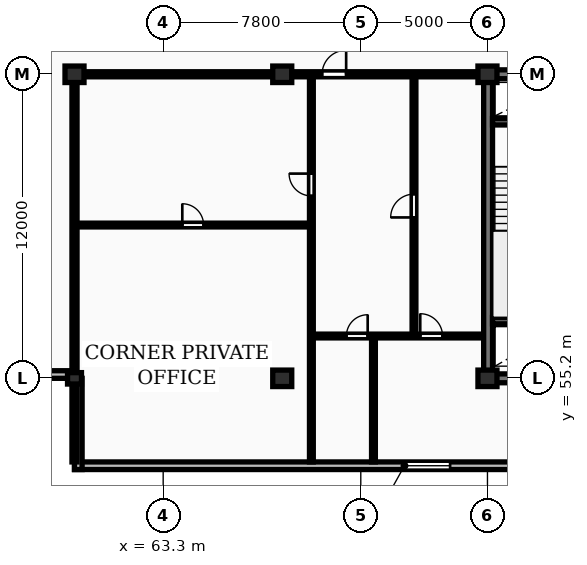
"""IFC4 building model, lengths in metres.
Left out: names, types, materials, properties, quantities, classifications, styles, units other than length and angle.
Written with IfcOpenShell. Run it as: python <this file> out.ifc"""

import sys

from ifc_helpers import new_model, si_unit, direction, frame, frame_2d, origin, origin_2d, place, context, subcontext, project, spatial, rectangle, extrude, element, fill, save


model = new_model("IFC4")
c1 = context("Model", 3, precision=1e-05, world=origin(), true_north=direction((0.0, 1.0)))
c2 = subcontext(c1, "Body", "Model", "MODEL_VIEW")
j1 = project(units=[si_unit("LENGTHUNIT", "METRE"), si_unit("PLANEANGLEUNIT", "RADIAN")], contexts=[c1])
p1 = place(None, origin())
s1 = spatial("IfcSite", under=j1, at=p1, CompositionType="ELEMENT")
p2 = place(p1, origin())
s2 = spatial("IfcBuilding", under=s1, at=p2, CompositionType="ELEMENT")
p3 = place(p2, frame((0.0, 0.0, 228.65)))
s3 = spatial("IfcBuildingStorey", under=s2, at=p3, CompositionType="ELEMENT", Elevation=228.65)
p4 = place(p3, frame((59.8, 55.2, 0.0), z_axis=(0.0, 0.0, 1.0), x_axis=(1.0, 0.0, 0.0)))
e1 = element("IfcColumn", 1, at=p4, inside=s3, PredefinedType="PILASTER", context=c2, shape_type="SweptSolid", body=[
    extrude(rectangle(XDim=0.55, YDim=0.45, at=origin_2d()), origin(), (0.0, 0.0, 1.0), 3.45),
])
for number, where, z_axis, x_axis in (
    (2, (59.8, 67.2, 0.0), (0.0, 0.0, 1.0), (1.0, 0.0, 0.0)),
    (3, (68.0, 55.2, 0.0), (0.0, 0.0, 1.0), (1.0, 0.0, 0.0)),
    (4, (68.0, 67.2, 0.0), (0.0, 0.0, 1.0), (1.0, 0.0, 0.0)),
    (5, (76.1, 55.2, 0.0), (0.0, 0.0, 1.0), (1.0, 0.0, 0.0)),
    (6, (76.1, 67.2, 0.0), (0.0, 0.0, 1.0), (1.0, 0.0, 0.0)),
):
    element("IfcColumn", number, at=place(p3, frame(where, z_axis=z_axis, x_axis=x_axis)), inside=s3, PredefinedType="COLUMN", context=c2, shape_type="SweptSolid", body=[
        extrude(rectangle(XDim=0.75, YDim=0.65, at=origin_2d()), origin(), (0.0, 0.0, 1.0), 3.45),
    ])
p5 = place(p3, frame((59.8, 51.75, 0.0), z_axis=(0.0, 0.0, 1.0), x_axis=(1.0, 0.0, 0.0)))
e7 = element("IfcWall", 7, at=p5, inside=s3, PredefinedType="STANDARD", context=c2, shape_type="SweptSolid", body=[
    extrude(rectangle(XDim=68.6, YDim=0.3, at=frame_2d((34.3, 0.0))), origin(), (0.0, 0.0, 1.0), 3.17),
])
p6 = place(p5, frame((13.025, 0.0, 0.85)))
e8 = element("IfcOpeningElement", 8, at=p6, cuts=e7, PredefinedType="OPENING", context=c2, shape_type="SweptSolid", body=[
    extrude(rectangle(XDim=1.8, YDim=1.8, at=frame_2d((0.9, 0.9))), frame((0.0, 0.16, 0.0), z_axis=(0.0, -1.0, 0.0), x_axis=(1.0, 0.0, 0.0)), (0.0, 0.0, 1.0), 0.32),
])
p7 = place(p5, frame((56.375, 0.0, 0.85)))
e9 = element("IfcOpeningElement", 9, at=p7, cuts=e7, PredefinedType="OPENING", context=c2, shape_type="SweptSolid", body=[
    extrude(rectangle(XDim=1.8, YDim=1.8, at=frame_2d((0.9, 0.9))), frame((0.0, 0.16, 0.0), z_axis=(0.0, -1.0, 0.0), x_axis=(1.0, 0.0, 0.0)), (0.0, 0.0, 1.0), 0.32),
])
p8 = place(p3, frame((56.2, 55.35, 0.0), z_axis=(0.0, 0.0, 1.0), x_axis=(1.0, 0.0, 0.0)))
e10 = element("IfcWall", 10, at=p8, inside=s3, PredefinedType="STANDARD", context=c2, shape_type="SweptSolid", body=[
    extrude(rectangle(XDim=3.6, YDim=0.3, at=frame_2d((1.8, 0.0))), origin(), (0.0, 0.0, 1.0), 3.17),
])
p9 = place(p3, frame((59.95, 55.2, 0.0), z_axis=(0.0, 0.0, 1.0), x_axis=(0.0, -1.0, 0.0)))
e11 = element("IfcWall", 11, at=p9, inside=s3, PredefinedType="STANDARD", context=c2, shape_type="SweptSolid", body=[
    extrude(rectangle(XDim=3.6, YDim=0.3, at=frame_2d((1.8, 0.0))), origin(), (0.0, 0.0, 1.0), 3.17),
])
p10 = place(p3, frame((75.95, 55.2, 0.0), z_axis=(0.0, 0.0, 1.0), x_axis=(1.0, 0.0, 0.0)))
e12 = element("IfcWall", 12, at=p10, inside=s3, PredefinedType="SHEAR", context=c2, shape_type="SweptSolid", body=[
    extrude(rectangle(XDim=36.3, YDim=0.35, at=frame_2d((18.15, 0.0))), origin(), (0.0, 0.0, 1.0), 3.45),
])
p11 = place(p3, frame((76.125, 55.375, 0.0), z_axis=(0.0, 0.0, 1.0), x_axis=(0.0, 1.0, 0.0)))
e13 = element("IfcWall", 13, at=p11, inside=s3, PredefinedType="SHEAR", context=c2, shape_type="SweptSolid", body=[
    extrude(rectangle(XDim=11.65, YDim=0.35, at=frame_2d((5.825, 0.0))), origin(), (0.0, 0.0, 1.0), 3.45),
])
p12 = place(p3, frame((75.95, 67.2, 0.0), z_axis=(0.0, 0.0, 1.0), x_axis=(1.0, 0.0, 0.0)))
e14 = element("IfcWall", 14, at=p12, inside=s3, PredefinedType="SHEAR", context=c2, shape_type="SweptSolid", body=[
    extrude(rectangle(XDim=36.3, YDim=0.35, at=frame_2d((18.15, 0.0))), origin(), (0.0, 0.0, 1.0), 3.45),
])
p13 = place(p12, frame((5.25, 0.0, 0.0)))
e15 = element("IfcOpeningElement", 15, at=p13, cuts=e14, PredefinedType="OPENING", context=c2, shape_type="SweptSolid", body=[
    extrude(rectangle(XDim=1.0, YDim=2.15, at=frame_2d((0.5, 1.075))), frame((0.0, 0.185, 0.0), z_axis=(0.0, -1.0, 0.0), x_axis=(1.0, 0.0, 0.0)), (0.0, 0.0, 1.0), 0.37),
])
p14 = place(p12, frame((21.6, 0.0, 0.0)))
e16 = element("IfcOpeningElement", 16, at=p14, cuts=e14, PredefinedType="OPENING", context=c2, shape_type="SweptSolid", body=[
    extrude(rectangle(XDim=1.5, YDim=2.2, at=frame_2d((0.75, 1.1))), frame((0.0, 0.185, 0.0), z_axis=(0.0, -1.0, 0.0), x_axis=(1.0, 0.0, 0.0)), (0.0, 0.0, 1.0), 0.37),
])
p15 = place(p12, frame((30.45, 0.0, 0.0)))
e17 = element("IfcOpeningElement", 17, at=p15, cuts=e14, PredefinedType="OPENING", context=c2, shape_type="SweptSolid", body=[
    extrude(rectangle(XDim=1.0, YDim=2.15, at=frame_2d((0.5, 1.075))), frame((0.0, 0.185, 0.0), z_axis=(0.0, -1.0, 0.0), x_axis=(1.0, 0.0, 0.0)), (0.0, 0.0, 1.0), 0.37),
])
for number, where, z_axis, x_axis in (
    (18, (76.3, 57.475, 0.0), (0.0, 0.0, 1.0), (1.0, 0.0, 0.0)),
    (19, (76.3, 65.325, 0.0), (0.0, 0.0, 1.0), (1.0, 0.0, 0.0)),
):
    element("IfcWall", number, at=place(p3, frame(where, z_axis=z_axis, x_axis=x_axis)), inside=s3, PredefinedType="SHEAR", context=c2, shape_type="SweptSolid", body=[
        extrude(rectangle(XDim=3.24, YDim=0.25, at=frame_2d((1.62, 0.0))), origin(), (0.0, 0.0, 1.0), 3.45),
    ])
p16 = place(p3, frame((59.8, 51.9, 0.0), z_axis=(0.0, 0.0, 1.0), x_axis=(0.0, 1.0, 0.0)))
e20 = element("IfcWall", 20, at=p16, inside=s3, PredefinedType="PARTITIONING", context=c2, shape_type="SweptSolid", body=[
    extrude(rectangle(XDim=15.3, YDim=0.2, at=frame_2d((7.65, 0.0))), origin(), (0.0, 0.0, 1.0), 2.477),
])
p17 = place(p3, frame((59.8, 61.25, 0.0), z_axis=(0.0, 0.0, 1.0), x_axis=(1.0, 0.0, 0.0)))
e21 = element("IfcWall", 21, at=p17, inside=s3, PredefinedType="PARTITIONING", context=c2, shape_type="SweptSolid", body=[
    extrude(rectangle(XDim=9.35, YDim=0.15, at=frame_2d((4.675, 0.0))), origin(), (0.0, 0.0, 1.0), 3.17),
])
p18 = place(p17, frame((4.255, 0.0, 0.0)))
e22 = element("IfcOpeningElement", 22, at=p18, cuts=e21, PredefinedType="OPENING", context=c2, shape_type="SweptSolid", body=[
    extrude(rectangle(XDim=0.84, YDim=2.04, at=frame_2d((0.42, 1.02))), frame((0.0, 0.085, 0.0), z_axis=(0.0, -1.0, 0.0), x_axis=(1.0, 0.0, 0.0)), (0.0, 0.0, 1.0), 0.17),
])
p19 = place(p3, frame((69.15, 51.9, 0.0), z_axis=(0.0, 0.0, 1.0), x_axis=(0.0, 1.0, 0.0)))
e23 = element("IfcWall", 23, at=p19, inside=s3, PredefinedType="PARTITIONING", context=c2, shape_type="SweptSolid", body=[
    extrude(rectangle(XDim=15.25, YDim=0.15, at=frame_2d((7.625, 0.0))), origin(), (0.0, 0.0, 1.0), 3.17),
])
p20 = place(p19, frame((10.5, 0.0, 0.0)))
e24 = element("IfcOpeningElement", 24, at=p20, cuts=e23, PredefinedType="OPENING", context=c2, shape_type="SweptSolid", body=[
    extrude(rectangle(XDim=0.88, YDim=2.06, at=frame_2d((0.44, 1.03))), frame((0.0, 0.085, 0.0), z_axis=(0.0, -1.0, 0.0), x_axis=(1.0, 0.0, 0.0)), (0.0, 0.0, 1.0), 0.17),
])
p21 = place(p3, frame((73.2, 56.87, 0.0), z_axis=(0.0, 0.0, 1.0), x_axis=(0.0, 1.0, 0.0)))
e25 = element("IfcWall", 25, at=p21, inside=s3, PredefinedType="PARTITIONING", context=c2, shape_type="SweptSolid", body=[
    extrude(rectangle(XDim=10.28, YDim=0.15, at=frame_2d((5.14, 0.0))), origin(), (0.0, 0.0, 1.0), 3.17),
])
p22 = place(p21, frame((4.68, 0.0, 0.0)))
e26 = element("IfcOpeningElement", 26, at=p22, cuts=e25, PredefinedType="OPENING", context=c2, shape_type="SweptSolid", body=[
    extrude(rectangle(XDim=0.92, YDim=2.08, at=frame_2d((0.46, 1.04))), frame((0.0, 0.085, 0.0), z_axis=(0.0, -1.0, 0.0), x_axis=(1.0, 0.0, 0.0)), (0.0, 0.0, 1.0), 0.17),
])
p23 = place(p3, frame((71.6, 51.9, 0.0), z_axis=(0.0, 0.0, 1.0), x_axis=(0.0, 1.0, 0.0)))
e27 = element("IfcWall", 27, at=p23, inside=s3, PredefinedType="PARTITIONING", context=c2, shape_type="SweptSolid", body=[
    extrude(rectangle(XDim=4.97, YDim=0.15, at=frame_2d((2.485, 0.0))), origin(), (0.0, 0.0, 1.0), 3.17),
])
p24 = place(p3, frame((69.17, 56.87, 0.0), z_axis=(0.0, 0.0, 1.0), x_axis=(1.0, 0.0, 0.0)))
e28 = element("IfcWall", 28, at=p24, inside=s3, PredefinedType="PARTITIONING", context=c2, shape_type="SweptSolid", body=[
    extrude(rectangle(XDim=6.76, YDim=0.15, at=frame_2d((3.38, 0.0))), origin(), (0.0, 0.0, 1.0), 3.17),
])
p25 = place(p24, frame((1.362, 0.0, 0.0)))
e29 = element("IfcOpeningElement", 29, at=p25, cuts=e28, PredefinedType="OPENING", context=c2, shape_type="SweptSolid", body=[
    extrude(rectangle(XDim=0.84, YDim=2.04, at=frame_2d((0.42, 1.02))), frame((0.0, 0.085, 0.0), z_axis=(0.0, -1.0, 0.0), x_axis=(1.0, 0.0, 0.0)), (0.0, 0.0, 1.0), 0.17),
])
p26 = place(p24, frame((4.277, 0.0, 0.0)))
e30 = element("IfcOpeningElement", 30, at=p26, cuts=e28, PredefinedType="OPENING", context=c2, shape_type="SweptSolid", body=[
    extrude(rectangle(XDim=0.88, YDim=2.06, at=frame_2d((0.44, 1.03))), frame((0.0, 0.085, 0.0), z_axis=(0.0, -1.0, 0.0), x_axis=(1.0, 0.0, 0.0)), (0.0, 0.0, 1.0), 0.17),
])
p27 = place(p3, frame((59.8, 67.2, 0.0), z_axis=(0.0, 0.0, 1.0), x_axis=(1.0, 0.0, 0.0)))
e31 = element("IfcWall", 31, at=p27, inside=s3, PredefinedType="PARTITIONING", context=c2, shape_type="SweptSolid", body=[
    extrude(rectangle(XDim=16.15, YDim=0.2, at=frame_2d((8.075, 0.0))), origin(), (0.0, 0.0, 1.0), 2.633),
])
p28 = place(p27, frame((9.772, 0.0, 0.0)))
e32 = element("IfcOpeningElement", 32, at=p28, cuts=e31, PredefinedType="OPENING", context=c2, shape_type="SweptSolid", body=[
    extrude(rectangle(XDim=0.95, YDim=2.15, at=frame_2d((0.475, 1.075))), frame((0.0, 0.11, 0.0), z_axis=(0.0, -1.0, 0.0), x_axis=(1.0, 0.0, 0.0)), (0.0, 0.0, 1.0), 0.22),
])
p29 = place(p6, origin())
e33 = element("IfcWindow", 33, at=p29, inside=s3, PartitioningType="SINGLE_PANEL", PredefinedType="WINDOW", context=c2, shape_type="SweptSolid", body=[
    extrude(rectangle(XDim=1.8, YDim=1.8, at=frame_2d((0.9, 0.9))), frame((0.0, 0.03, 0.0), z_axis=(0.0, -1.0, 0.0), x_axis=(1.0, 0.0, 0.0)), (0.0, 0.0, 1.0), 0.06),
])
fill(e8, e33)
p30 = place(p18, origin())
e34 = element("IfcDoor", 34, at=p30, inside=s3, OperationType="SINGLE_SWING_LEFT", PredefinedType="DOOR", context=c2, shape_type="SweptSolid", body=[
    extrude(rectangle(XDim=0.84, YDim=2.04, at=frame_2d((0.42, 1.02))), frame((0.0, 0.025, 0.0), z_axis=(0.0, -1.0, 0.0), x_axis=(1.0, 0.0, 0.0)), (0.0, 0.0, 1.0), 0.05),
])
fill(e22, e34)
p31 = place(p20, origin())
e35 = element("IfcDoor", 35, at=p31, inside=s3, OperationType="SINGLE_SWING_RIGHT", PredefinedType="DOOR", context=c2, shape_type="SweptSolid", body=[
    extrude(rectangle(XDim=0.88, YDim=2.06, at=frame_2d((0.44, 1.03))), frame((0.0, 0.025, 0.0), z_axis=(0.0, -1.0, 0.0), x_axis=(1.0, 0.0, 0.0)), (0.0, 0.0, 1.0), 0.05),
])
fill(e24, e35)
p32 = place(p22, origin())
e36 = element("IfcDoor", 36, at=p32, inside=s3, OperationType="SINGLE_SWING_LEFT", PredefinedType="DOOR", context=c2, shape_type="SweptSolid", body=[
    extrude(rectangle(XDim=0.92, YDim=2.08, at=frame_2d((0.46, 1.04))), frame((0.0, 0.025, 0.0), z_axis=(0.0, -1.0, 0.0), x_axis=(1.0, 0.0, 0.0)), (0.0, 0.0, 1.0), 0.05),
])
fill(e26, e36)
p33 = place(p25, origin())
e37 = element("IfcDoor", 37, at=p33, inside=s3, OperationType="SINGLE_SWING_RIGHT", PredefinedType="DOOR", context=c2, shape_type="SweptSolid", body=[
    extrude(rectangle(XDim=0.84, YDim=2.04, at=frame_2d((0.42, 1.02))), frame((0.0, 0.025, 0.0), z_axis=(0.0, -1.0, 0.0), x_axis=(1.0, 0.0, 0.0)), (0.0, 0.0, 1.0), 0.05),
])
fill(e29, e37)
p34 = place(p26, origin())
e38 = element("IfcDoor", 38, at=p34, inside=s3, OperationType="SINGLE_SWING_LEFT", PredefinedType="DOOR", context=c2, shape_type="SweptSolid", body=[
    extrude(rectangle(XDim=0.88, YDim=2.06, at=frame_2d((0.44, 1.03))), frame((0.0, 0.025, 0.0), z_axis=(0.0, -1.0, 0.0), x_axis=(1.0, 0.0, 0.0)), (0.0, 0.0, 1.0), 0.05),
])
fill(e30, e38)
p35 = place(p28, origin())
e39 = element("IfcDoor", 39, at=p35, inside=s3, OperationType="SINGLE_SWING_RIGHT", PredefinedType="DOOR", context=c2, shape_type="SweptSolid", body=[
    extrude(rectangle(XDim=0.95, YDim=2.15, at=frame_2d((0.475, 1.075))), frame((0.0, 0.025, 0.0), z_axis=(0.0, -1.0, 0.0), x_axis=(1.0, 0.0, 0.0)), (0.0, 0.0, 1.0), 0.05),
])
fill(e32, e39)
save(model, sys.argv[1])
